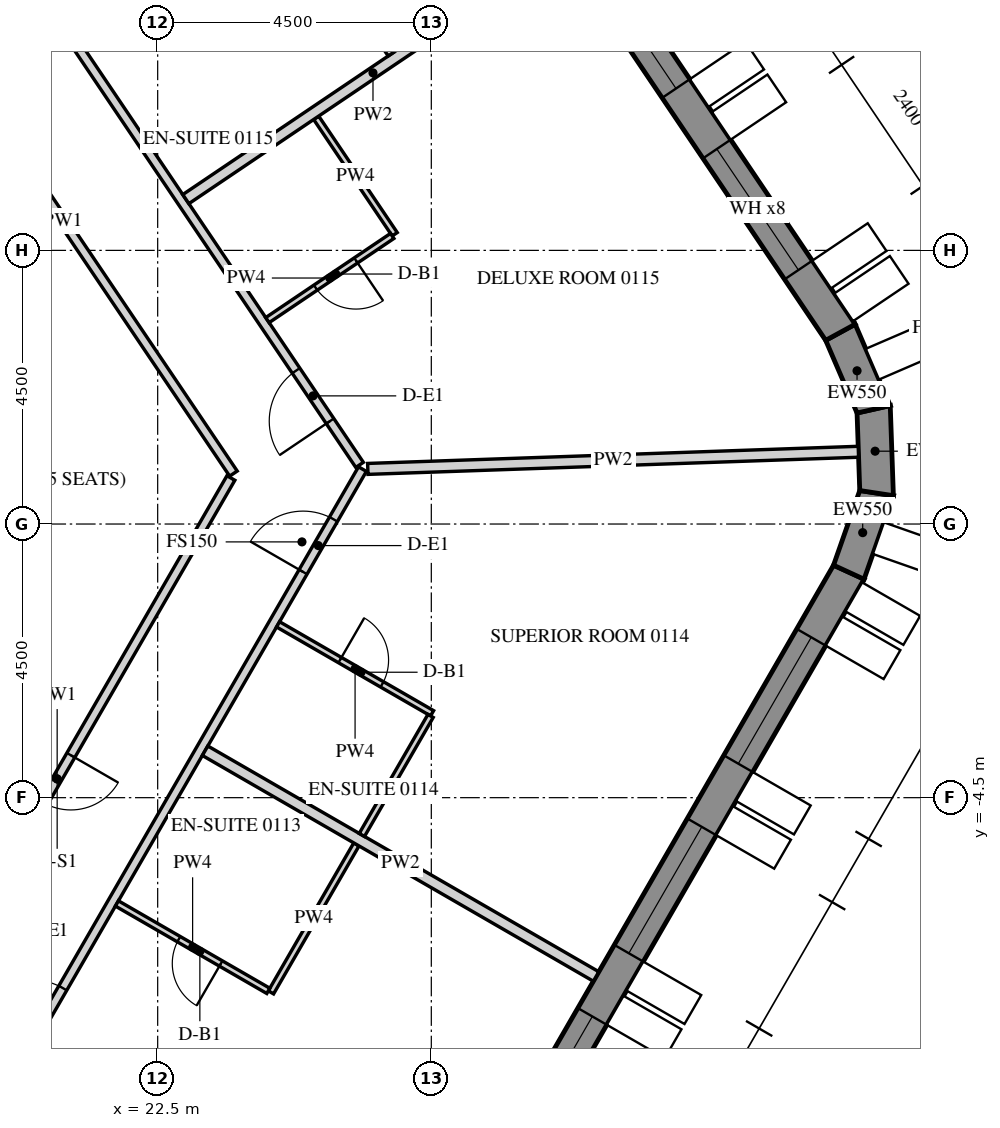
"""IFC4 building model, lengths in metres.
Left out: names, types, materials, properties, quantities, classifications, styles, units other than length and angle.
Written with IfcOpenShell. Run it as: python <this file> out.ifc"""

import sys

from ifc_helpers import new_model, si_unit, direction, frame, frame_2d, origin, place, context, subcontext, project, spatial, polyline, rectangle, outline, extrude, element, fill, save


model = new_model("IFC4")
c1 = context("Model", 3, precision=1e-05, world=origin(), true_north=direction((0.0, 1.0)))
c2 = subcontext(c1, "Body", "Model", "MODEL_VIEW")
j1 = project(units=[si_unit("LENGTHUNIT", "METRE"), si_unit("PLANEANGLEUNIT", "RADIAN")], contexts=[c1])
p1 = place(None, origin())
s1 = spatial("IfcSite", under=j1, at=p1, CompositionType="ELEMENT")
p2 = place(p1, origin())
s2 = spatial("IfcBuilding", under=s1, at=p2, CompositionType="ELEMENT")
p3 = place(p2, frame((0.0, 0.0, 37.5)))
s3 = spatial("IfcBuildingStorey", under=s2, at=p3, CompositionType="ELEMENT", Elevation=37.5)
p4 = place(p3, frame((18.83, -26.835, -0.15), z_axis=(0.0, 0.0, 1.0), x_axis=(0.500003800416, 0.866023209602, 0.0)))
e1 = element("IfcWall", 1, at=p4, inside=s3, PredefinedType="SOLIDWALL", context=c2, shape_type="SweptSolid", body=[
    extrude(outline(polyline([(-0.022, -0.275), (30.097, -0.275), (30.045, 0.275), (0.022, 0.275), (-0.022, -0.275)])), origin(), (0.0, 0.0, 1.0), 3.9),
])
p5 = place(p4, frame((1.236, 0.0, 1.05)))
e2 = element("IfcOpeningElement", 2, at=p5, cuts=e1, PredefinedType="OPENING", context=c2, shape_type="SweptSolid", body=[
    extrude(rectangle(XDim=2.4, YDim=2.4, at=frame_2d((1.2, 1.2))), frame((0.0, 0.285, 0.0), z_axis=(0.0, -1.0, 0.0), x_axis=(1.0, 0.0, 0.0)), (0.0, 0.0, 1.0), 0.57),
])
p6 = place(p4, frame((4.835, 0.0, 1.05)))
e3 = element("IfcOpeningElement", 3, at=p6, cuts=e1, PredefinedType="OPENING", context=c2, shape_type="SweptSolid", body=[
    extrude(rectangle(XDim=2.4, YDim=2.4, at=frame_2d((1.2, 1.2))), frame((0.0, 0.285, 0.0), z_axis=(0.0, -1.0, 0.0), x_axis=(1.0, 0.0, 0.0)), (0.0, 0.0, 1.0), 0.57),
])
p7 = place(p4, frame((8.436, 0.0, 1.05)))
e4 = element("IfcOpeningElement", 4, at=p7, cuts=e1, PredefinedType="OPENING", context=c2, shape_type="SweptSolid", body=[
    extrude(rectangle(XDim=2.4, YDim=2.4, at=frame_2d((1.2, 1.2))), frame((0.0, 0.285, 0.0), z_axis=(0.0, -1.0, 0.0), x_axis=(1.0, 0.0, 0.0)), (0.0, 0.0, 1.0), 0.57),
])
p8 = place(p4, frame((12.035, 0.0, 1.05)))
e5 = element("IfcOpeningElement", 5, at=p8, cuts=e1, PredefinedType="OPENING", context=c2, shape_type="SweptSolid", body=[
    extrude(rectangle(XDim=2.4, YDim=2.4, at=frame_2d((1.2, 1.2))), frame((0.0, 0.285, 0.0), z_axis=(0.0, -1.0, 0.0), x_axis=(1.0, 0.0, 0.0)), (0.0, 0.0, 1.0), 0.57),
])
p9 = place(p4, frame((15.635, 0.0, 1.05)))
e6 = element("IfcOpeningElement", 6, at=p9, cuts=e1, PredefinedType="OPENING", context=c2, shape_type="SweptSolid", body=[
    extrude(rectangle(XDim=2.4, YDim=2.4, at=frame_2d((1.2, 1.2))), frame((0.0, 0.285, 0.0), z_axis=(0.0, -1.0, 0.0), x_axis=(1.0, 0.0, 0.0)), (0.0, 0.0, 1.0), 0.57),
])
p10 = place(p4, frame((19.236, 0.0, 1.05)))
e7 = element("IfcOpeningElement", 7, at=p10, cuts=e1, PredefinedType="OPENING", context=c2, shape_type="SweptSolid", body=[
    extrude(rectangle(XDim=2.4, YDim=2.4, at=frame_2d((1.2, 1.2))), frame((0.0, 0.285, 0.0), z_axis=(0.0, -1.0, 0.0), x_axis=(1.0, 0.0, 0.0)), (0.0, 0.0, 1.0), 0.57),
])
p11 = place(p4, frame((22.835, 0.0, 1.05)))
e8 = element("IfcOpeningElement", 8, at=p11, cuts=e1, PredefinedType="OPENING", context=c2, shape_type="SweptSolid", body=[
    extrude(rectangle(XDim=2.4, YDim=2.4, at=frame_2d((1.2, 1.2))), frame((0.0, 0.285, 0.0), z_axis=(0.0, -1.0, 0.0), x_axis=(1.0, 0.0, 0.0)), (0.0, 0.0, 1.0), 0.57),
])
p12 = place(p4, frame((26.436, 0.0, 1.05)))
e9 = element("IfcOpeningElement", 9, at=p12, cuts=e1, PredefinedType="OPENING", context=c2, shape_type="SweptSolid", body=[
    extrude(rectangle(XDim=2.4, YDim=2.4, at=frame_2d((1.2, 1.2))), frame((0.0, 0.285, 0.0), z_axis=(0.0, -1.0, 0.0), x_axis=(1.0, 0.0, 0.0)), (0.0, 0.0, 1.0), 0.57),
])
p13 = place(p3, frame((33.866, -0.792, -0.15), z_axis=(0.0, 0.0, 1.0), x_axis=(0.33111537203, 0.943590276765, 0.0)))
e10 = element("IfcWall", 10, at=p13, inside=s3, PredefinedType="SOLIDWALL", context=c2, shape_type="SweptSolid", body=[
    extrude(outline(polyline([(-0.026, -0.275), (1.431, -0.275), (1.327, 0.275), (0.026, 0.275), (-0.026, -0.275)])), origin(), (0.0, 0.0, 1.0), 3.9),
])
p14 = place(p3, frame((34.323, 0.509, -0.15), z_axis=(0.0, 0.0, 1.0), x_axis=(-0.034876908462, 0.999391615562, 0.0)))
e11 = element("IfcWall", 11, at=p14, inside=s3, PredefinedType="SOLIDWALL", context=c2, shape_type="SweptSolid", body=[
    extrude(outline(polyline([(-0.052, -0.275), (1.431, -0.275), (1.327, 0.275), (0.052, 0.275), (-0.052, -0.275)])), origin(), (0.0, 0.0, 1.0), 3.9),
])
p15 = place(p3, frame((34.274, 1.887, -0.15), z_axis=(0.0, 0.0, 1.0), x_axis=(-0.396161342798, 0.918180913803, 0.0)))
e12 = element("IfcWall", 12, at=p15, inside=s3, PredefinedType="SOLIDWALL", context=c2, shape_type="SweptSolid", body=[
    extrude(outline(polyline([(-0.052, -0.275), (1.405, -0.275), (1.354, 0.275), (0.052, 0.275), (-0.052, -0.275)])), origin(), (0.0, 0.0, 1.0), 3.9),
])
p16 = place(p3, frame((33.728, 3.153, -0.15), z_axis=(0.0, 0.0, 1.0), x_axis=(-0.559192411416, 0.82903790445, 0.0)))
e13 = element("IfcWall", 13, at=p16, inside=s3, PredefinedType="SOLIDWALL", context=c2, shape_type="SweptSolid", body=[
    extrude(outline(polyline([(-0.026, -0.275), (30.093, -0.275), (30.048, 0.275), (0.026, 0.275), (-0.026, -0.275)])), origin(), (0.0, 0.0, 1.0), 3.9),
])
p17 = place(p16, frame((1.236, 0.0, 1.05)))
e14 = element("IfcOpeningElement", 14, at=p17, cuts=e13, PredefinedType="OPENING", context=c2, shape_type="SweptSolid", body=[
    extrude(rectangle(XDim=2.4, YDim=2.4, at=frame_2d((1.2, 1.2))), frame((0.0, 0.285, 0.0), z_axis=(0.0, -1.0, 0.0), x_axis=(1.0, 0.0, 0.0)), (0.0, 0.0, 1.0), 0.57),
])
p18 = place(p16, frame((4.835, 0.0, 1.05)))
e15 = element("IfcOpeningElement", 15, at=p18, cuts=e13, PredefinedType="OPENING", context=c2, shape_type="SweptSolid", body=[
    extrude(rectangle(XDim=2.4, YDim=2.4, at=frame_2d((1.2, 1.2))), frame((0.0, 0.285, 0.0), z_axis=(0.0, -1.0, 0.0), x_axis=(1.0, 0.0, 0.0)), (0.0, 0.0, 1.0), 0.57),
])
p19 = place(p16, frame((8.436, 0.0, 1.05)))
e16 = element("IfcOpeningElement", 16, at=p19, cuts=e13, PredefinedType="OPENING", context=c2, shape_type="SweptSolid", body=[
    extrude(rectangle(XDim=2.4, YDim=2.4, at=frame_2d((1.2, 1.2))), frame((0.0, 0.285, 0.0), z_axis=(0.0, -1.0, 0.0), x_axis=(1.0, 0.0, 0.0)), (0.0, 0.0, 1.0), 0.57),
])
p20 = place(p16, frame((12.035, 0.0, 1.05)))
e17 = element("IfcOpeningElement", 17, at=p20, cuts=e13, PredefinedType="OPENING", context=c2, shape_type="SweptSolid", body=[
    extrude(rectangle(XDim=2.4, YDim=2.4, at=frame_2d((1.2, 1.2))), frame((0.0, 0.285, 0.0), z_axis=(0.0, -1.0, 0.0), x_axis=(1.0, 0.0, 0.0)), (0.0, 0.0, 1.0), 0.57),
])
p21 = place(p16, frame((15.635, 0.0, 1.05)))
e18 = element("IfcOpeningElement", 18, at=p21, cuts=e13, PredefinedType="OPENING", context=c2, shape_type="SweptSolid", body=[
    extrude(rectangle(XDim=2.4, YDim=2.4, at=frame_2d((1.2, 1.2))), frame((0.0, 0.285, 0.0), z_axis=(0.0, -1.0, 0.0), x_axis=(1.0, 0.0, 0.0)), (0.0, 0.0, 1.0), 0.57),
])
p22 = place(p16, frame((19.236, 0.0, 1.05)))
e19 = element("IfcOpeningElement", 19, at=p22, cuts=e13, PredefinedType="OPENING", context=c2, shape_type="SweptSolid", body=[
    extrude(rectangle(XDim=2.4, YDim=2.4, at=frame_2d((1.2, 1.2))), frame((0.0, 0.285, 0.0), z_axis=(0.0, -1.0, 0.0), x_axis=(1.0, 0.0, 0.0)), (0.0, 0.0, 1.0), 0.57),
])
p23 = place(p16, frame((22.835, 0.0, 1.05)))
e20 = element("IfcOpeningElement", 20, at=p23, cuts=e13, PredefinedType="OPENING", context=c2, shape_type="SweptSolid", body=[
    extrude(rectangle(XDim=2.4, YDim=2.4, at=frame_2d((1.2, 1.2))), frame((0.0, 0.285, 0.0), z_axis=(0.0, -1.0, 0.0), x_axis=(1.0, 0.0, 0.0)), (0.0, 0.0, 1.0), 0.57),
])
p24 = place(p16, frame((26.436, 0.0, 1.05)))
e21 = element("IfcOpeningElement", 21, at=p24, cuts=e13, PredefinedType="OPENING", context=c2, shape_type="SweptSolid", body=[
    extrude(rectangle(XDim=2.4, YDim=2.4, at=frame_2d((1.2, 1.2))), frame((0.0, 0.285, 0.0), z_axis=(0.0, -1.0, 0.0), x_axis=(1.0, 0.0, 0.0)), (0.0, 0.0, 1.0), 0.57),
])
p25 = place(p3, frame((13.928, -19.775, 0.0), z_axis=(0.0, 0.0, 1.0), x_axis=(0.50000450071, 0.866022805283, 0.0)))
e22 = element("IfcWall", 22, at=p25, inside=s3, PredefinedType="PARTITIONING", context=c2, shape_type="SweptSolid", body=[
    extrude(rectangle(XDim=23.877, YDim=0.15, at=frame_2d((11.938, 0.0))), origin(), (0.0, 0.0, 1.0), 2.988),
])
p26 = place(p25, frame((8.573, 0.0, 0.0)))
e23 = element("IfcOpeningElement", 23, at=p26, cuts=e22, PredefinedType="OPENING", context=c2, shape_type="SweptSolid", body=[
    extrude(rectangle(XDim=1.0, YDim=2.1, at=frame_2d((0.5, 1.05))), frame((0.0, 0.085, 0.0), z_axis=(0.0, -1.0, 0.0), x_axis=(1.0, 0.0, 0.0)), (0.0, 0.0, 1.0), 0.17),
])
p27 = place(p25, frame((13.022, 0.0, 0.0)))
e24 = element("IfcOpeningElement", 24, at=p27, cuts=e22, PredefinedType="OPENING", context=c2, shape_type="SweptSolid", body=[
    extrude(rectangle(XDim=1.0, YDim=2.1, at=frame_2d((0.5, 1.05))), frame((0.0, 0.085, 0.0), z_axis=(0.0, -1.0, 0.0), x_axis=(1.0, 0.0, 0.0)), (0.0, 0.0, 1.0), 0.17),
])
p28 = place(p25, frame((21.925, 0.0, 0.0)))
e25 = element("IfcOpeningElement", 25, at=p28, cuts=e22, PredefinedType="OPENING", context=c2, shape_type="SweptSolid", body=[
    extrude(rectangle(XDim=1.0, YDim=2.1, at=frame_2d((0.5, 1.05))), frame((0.0, 0.085, 0.0), z_axis=(0.0, -1.0, 0.0), x_axis=(1.0, 0.0, 0.0)), (0.0, 0.0, 1.0), 0.17),
])
p29 = place(p3, frame((25.821, 0.972, 0.0), z_axis=(0.0, 0.0, 1.0), x_axis=(-0.559193816298, 0.829036956845, 0.0)))
e26 = element("IfcWall", 26, at=p29, inside=s3, PredefinedType="PARTITIONING", context=c2, shape_type="SweptSolid", body=[
    extrude(rectangle(XDim=22.002, YDim=0.15, at=frame_2d((11.001, 0.0))), origin(), (0.0, 0.0, 1.0), 2.988),
])
p30 = place(p29, frame((0.869, 0.0, 0.0)))
e27 = element("IfcOpeningElement", 27, at=p30, cuts=e26, PredefinedType="OPENING", context=c2, shape_type="SweptSolid", body=[
    extrude(rectangle(XDim=1.0, YDim=2.1, at=frame_2d((0.5, 1.05))), frame((0.0, 0.085, 0.0), z_axis=(0.0, -1.0, 0.0), x_axis=(1.0, 0.0, 0.0)), (0.0, 0.0, 1.0), 0.17),
])
p31 = place(p29, frame((10.721, 0.0, 0.0)))
e28 = element("IfcOpeningElement", 28, at=p31, cuts=e26, PredefinedType="OPENING", context=c2, shape_type="SweptSolid", body=[
    extrude(rectangle(XDim=1.0, YDim=2.1, at=frame_2d((0.5, 1.05))), frame((0.0, 0.085, 0.0), z_axis=(0.0, -1.0, 0.0), x_axis=(1.0, 0.0, 0.0)), (0.0, 0.0, 1.0), 0.17),
])
p32 = place(p3, frame((18.14, 9.141, 0.0), z_axis=(0.0, 0.0, 1.0), x_axis=(0.55918799196, -0.829040885389, 0.0)))
e29 = element("IfcWall", 29, at=p32, inside=s3, PredefinedType="PARTITIONING", context=c2, shape_type="SweptSolid", body=[
    extrude(rectangle(XDim=10.025, YDim=0.15, at=frame_2d((5.013, 0.0))), origin(), (0.0, 0.0, 1.0), 2.988),
])
p33 = place(p3, frame((23.704, 0.757, 0.0), z_axis=(0.0, 0.0, 1.0), x_axis=(-0.500010297365, -0.866019458516, 0.0)))
e30 = element("IfcWall", 30, at=p33, inside=s3, PredefinedType="PARTITIONING", context=c2, shape_type="SweptSolid", body=[
    extrude(rectangle(XDim=11.429, YDim=0.15, at=frame_2d((5.714, 0.0))), origin(), (0.0, 0.0, 1.0), 2.988),
])
p34 = place(p33, frame((5.264, 0.0, 0.0)))
e31 = element("IfcOpeningElement", 31, at=p34, cuts=e30, PredefinedType="OPENING", context=c2, shape_type="SweptSolid", body=[
    extrude(rectangle(XDim=0.9, YDim=2.1, at=frame_2d((0.45, 1.05))), frame((0.0, 0.085, 0.0), z_axis=(0.0, -1.0, 0.0), x_axis=(1.0, 0.0, 0.0)), (0.0, 0.0, 1.0), 0.17),
])
p35 = place(p3, frame((25.768, -5.269, 0.0), z_axis=(0.0, 0.0, 1.0), x_axis=(-0.499998209175, -0.866026437715, 0.0)))
e32 = element("IfcWall", 32, at=p35, inside=s3, PredefinedType="PARTITIONING", context=c2, shape_type="SweptSolid", body=[
    extrude(rectangle(XDim=2.81, YDim=0.1, at=frame_2d((1.405, 0.0))), origin(), (0.0, 0.0, 1.0), 2.988),
])
p36 = place(p3, frame((24.32, -7.677, 0.0), z_axis=(0.0, 0.0, 1.0), x_axis=(-0.866018712932, 0.500011588718, 0.0)))
e33 = element("IfcWall", 33, at=p36, inside=s3, PredefinedType="PARTITIONING", context=c2, shape_type="SweptSolid", body=[
    extrude(rectangle(XDim=2.875, YDim=0.1, at=frame_2d((1.438, 0.0))), origin(), (0.0, 0.0, 1.0), 2.988),
])
p37 = place(p36, frame((0.9, 0.0, 0.0)))
e34 = element("IfcOpeningElement", 34, at=p37, cuts=e33, PredefinedType="OPENING", context=c2, shape_type="SweptSolid", body=[
    extrude(rectangle(XDim=0.8, YDim=2.1, at=frame_2d((0.4, 1.05))), frame((0.0, 0.06, 0.0), z_axis=(0.0, -1.0, 0.0), x_axis=(1.0, 0.0, 0.0)), (0.0, 0.0, 1.0), 0.12),
])
p38 = place(p3, frame((29.71, -7.441, 0.0), z_axis=(0.0, 0.0, 1.0), x_axis=(-0.866014745021, 0.500018461065, 0.0)))
e35 = element("IfcWall", 35, at=p38, inside=s3, PredefinedType="PARTITIONING", context=c2, shape_type="SweptSolid", body=[
    extrude(rectangle(XDim=7.425, YDim=0.18, at=frame_2d((3.712, 0.0))), origin(), (0.0, 0.0, 1.0), 2.988),
])
p39 = place(p3, frame((24.48, -1.65, 0.0), z_axis=(0.0, 0.0, 1.0), x_axis=(0.866046596414, -0.499963291492, 0.0)))
e36 = element("IfcWall", 36, at=p39, inside=s3, PredefinedType="PARTITIONING", context=c2, shape_type="SweptSolid", body=[
    extrude(rectangle(XDim=2.925, YDim=0.1, at=frame_2d((1.462, 0.0))), origin(), (0.0, 0.0, 1.0), 2.988),
])
p40 = place(p39, frame((1.175, 0.0, 0.0)))
e37 = element("IfcOpeningElement", 37, at=p40, cuts=e36, PredefinedType="OPENING", context=c2, shape_type="SweptSolid", body=[
    extrude(rectangle(XDim=0.8, YDim=2.1, at=frame_2d((0.4, 1.05))), frame((0.0, 0.06, 0.0), z_axis=(0.0, -1.0, 0.0), x_axis=(1.0, 0.0, 0.0)), (0.0, 0.0, 1.0), 0.12),
])
p41 = place(p3, frame((26.988, -3.156, 0.0), z_axis=(0.0, 0.0, 1.0), x_axis=(-0.4999967785, -0.866027263711, 0.0)))
e38 = element("IfcWall", 38, at=p41, inside=s3, PredefinedType="PARTITIONING", context=c2, shape_type="SweptSolid", body=[
    extrude(rectangle(XDim=2.26, YDim=0.1, at=frame_2d((1.13, 0.0))), origin(), (0.0, 0.0, 1.0), 2.988),
])
p42 = place(p3, frame((34.023, 1.188, 0.0), z_axis=(0.0, 0.0, 1.0), x_axis=(-0.999390818315, -0.03489974594, 0.0)))
e39 = element("IfcWall", 39, at=p42, inside=s3, PredefinedType="PARTITIONING", context=c2, shape_type="SweptSolid", body=[
    extrude(rectangle(XDim=8.073, YDim=0.18, at=frame_2d((4.036, 0.0))), origin(), (0.0, 0.0, 1.0), 2.988),
])
p43 = place(p3, frame((25.107, 6.68, 0.0), z_axis=(0.0, 0.0, 1.0), x_axis=(0.559204176839, -0.829029968461, 0.0)))
e40 = element("IfcWall", 40, at=p43, inside=s3, PredefinedType="PARTITIONING", context=c2, shape_type="SweptSolid", body=[
    extrude(rectangle(XDim=2.31, YDim=0.1, at=frame_2d((1.155, 0.0))), origin(), (0.0, 0.0, 1.0), 2.988),
])
p44 = place(p3, frame((26.357, 4.737, 0.0), z_axis=(0.0, 0.0, 1.0), x_axis=(-0.829094460354, -0.559108554585, 0.0)))
e41 = element("IfcWall", 41, at=p44, inside=s3, PredefinedType="PARTITIONING", context=c2, shape_type="SweptSolid", body=[
    extrude(rectangle(XDim=2.475, YDim=0.1, at=frame_2d((1.238, 0.0))), origin(), (0.0, 0.0, 1.0), 2.988),
])
p45 = place(p44, frame((0.72, 0.0, 0.0)))
e42 = element("IfcOpeningElement", 42, at=p45, cuts=e41, PredefinedType="OPENING", context=c2, shape_type="SweptSolid", body=[
    extrude(rectangle(XDim=0.8, YDim=2.1, at=frame_2d((0.4, 1.05))), frame((0.0, 0.06, 0.0), z_axis=(0.0, -1.0, 0.0), x_axis=(1.0, 0.0, 0.0)), (0.0, 0.0, 1.0), 0.12),
])
p46 = place(p3, frame((29.119, 9.495, 0.0), z_axis=(0.0, 0.0, 1.0), x_axis=(-0.829038452737, -0.559191598545, 0.0)))
e43 = element("IfcWall", 43, at=p46, inside=s3, PredefinedType="PARTITIONING", context=c2, shape_type="SweptSolid", body=[
    extrude(rectangle(XDim=7.425, YDim=0.18, at=frame_2d((3.713, 0.0))), origin(), (0.0, 0.0, 1.0), 2.988),
])
p47 = place(p3, frame((26.333, 7.724, 0.0), z_axis=(0.0, 0.0, 1.0), x_axis=(-0.559185029686, 0.829042883435, 0.0)))
e44 = element("IfcWall", 44, at=p47, inside=s3, PredefinedType="PARTITIONING", context=c2, shape_type="SweptSolid", body=[
    extrude(rectangle(XDim=7.11, YDim=0.1, at=frame_2d((3.555, 0.0))), origin(), (0.0, 0.0, 1.0), 2.988),
])
p48 = place(p47, frame((3.06, 0.0, 0.0)))
e45 = element("IfcOpeningElement", 45, at=p48, cuts=e44, PredefinedType="OPENING", context=c2, shape_type="SweptSolid", body=[
    extrude(rectangle(XDim=0.9, YDim=2.1, at=frame_2d((0.45, 1.05))), frame((0.0, 0.06, 0.0), z_axis=(0.0, -1.0, 0.0), x_axis=(1.0, 0.0, 0.0)), (0.0, 0.0, 1.0), 0.12),
])
p49 = place(p10, frame((0.0, 0.205, 0.0)))
e46 = element("IfcWindow", 46, at=p49, inside=s3, PartitioningType="DOUBLE_PANEL_VERTICAL", PredefinedType="WINDOW", context=c2, shape_type="SweptSolid", body=[
    extrude(rectangle(XDim=2.4, YDim=2.4, at=frame_2d((1.2, 1.2))), frame((0.0, 0.03, 0.0), z_axis=(0.0, -1.0, 0.0), x_axis=(1.0, 0.0, 0.0)), (0.0, 0.0, 1.0), 0.06),
])
fill(e7, e46)
p50 = place(p11, frame((0.0, 0.205, 0.0)))
e47 = element("IfcWindow", 47, at=p50, inside=s3, PartitioningType="DOUBLE_PANEL_VERTICAL", PredefinedType="WINDOW", context=c2, shape_type="SweptSolid", body=[
    extrude(rectangle(XDim=2.4, YDim=2.4, at=frame_2d((1.2, 1.2))), frame((0.0, 0.03, 0.0), z_axis=(0.0, -1.0, 0.0), x_axis=(1.0, 0.0, 0.0)), (0.0, 0.0, 1.0), 0.06),
])
fill(e8, e47)
p51 = place(p12, frame((0.0, 0.205, 0.0)))
e48 = element("IfcWindow", 48, at=p51, inside=s3, PartitioningType="DOUBLE_PANEL_VERTICAL", PredefinedType="WINDOW", context=c2, shape_type="SweptSolid", body=[
    extrude(rectangle(XDim=2.4, YDim=2.4, at=frame_2d((1.2, 1.2))), frame((0.0, 0.03, 0.0), z_axis=(0.0, -1.0, 0.0), x_axis=(1.0, 0.0, 0.0)), (0.0, 0.0, 1.0), 0.06),
])
fill(e9, e48)
p52 = place(p17, frame((0.0, 0.205, 0.0)))
e49 = element("IfcWindow", 49, at=p52, inside=s3, PartitioningType="DOUBLE_PANEL_VERTICAL", PredefinedType="WINDOW", context=c2, shape_type="SweptSolid", body=[
    extrude(rectangle(XDim=2.4, YDim=2.4, at=frame_2d((1.2, 1.2))), frame((0.0, 0.03, 0.0), z_axis=(0.0, -1.0, 0.0), x_axis=(1.0, 0.0, 0.0)), (0.0, 0.0, 1.0), 0.06),
])
fill(e14, e49)
p53 = place(p18, frame((0.0, 0.205, 0.0)))
e50 = element("IfcWindow", 50, at=p53, inside=s3, PartitioningType="DOUBLE_PANEL_VERTICAL", PredefinedType="WINDOW", context=c2, shape_type="SweptSolid", body=[
    extrude(rectangle(XDim=2.4, YDim=2.4, at=frame_2d((1.2, 1.2))), frame((0.0, 0.03, 0.0), z_axis=(0.0, -1.0, 0.0), x_axis=(1.0, 0.0, 0.0)), (0.0, 0.0, 1.0), 0.06),
])
fill(e15, e50)
p54 = place(p27, origin())
e51 = element("IfcDoor", 51, at=p54, inside=s3, OperationType="SINGLE_SWING_RIGHT", PredefinedType="DOOR", context=c2, shape_type="SweptSolid", body=[
    extrude(rectangle(XDim=1.0, YDim=2.1, at=frame_2d((0.5, 1.05))), frame((0.0, 0.025, 0.0), z_axis=(0.0, -1.0, 0.0), x_axis=(1.0, 0.0, 0.0)), (0.0, 0.0, 1.0), 0.05),
])
fill(e24, e51)
p55 = place(p37, origin())
e52 = element("IfcDoor", 52, at=p55, inside=s3, OperationType="SINGLE_SWING_RIGHT", PredefinedType="DOOR", context=c2, shape_type="SweptSolid", body=[
    extrude(rectangle(XDim=0.8, YDim=2.1, at=frame_2d((0.4, 1.05))), frame((0.0, 0.025, 0.0), z_axis=(0.0, -1.0, 0.0), x_axis=(1.0, 0.0, 0.0)), (0.0, 0.0, 1.0), 0.05),
])
fill(e34, e52)
p56 = place(p28, origin())
e53 = element("IfcDoor", 53, at=p56, inside=s3, OperationType="SINGLE_SWING_RIGHT", PredefinedType="DOOR", context=c2, shape_type="SweptSolid", body=[
    extrude(rectangle(XDim=1.0, YDim=2.1, at=frame_2d((0.5, 1.05))), frame((0.0, 0.025, 0.0), z_axis=(0.0, -1.0, 0.0), x_axis=(1.0, 0.0, 0.0)), (0.0, 0.0, 1.0), 0.05),
])
fill(e25, e53)
p57 = place(p40, origin())
e54 = element("IfcDoor", 54, at=p57, inside=s3, OperationType="SINGLE_SWING_LEFT", PredefinedType="DOOR", context=c2, shape_type="SweptSolid", body=[
    extrude(rectangle(XDim=0.8, YDim=2.1, at=frame_2d((0.4, 1.05))), frame((0.0, 0.025, 0.0), z_axis=(0.0, -1.0, 0.0), x_axis=(1.0, 0.0, 0.0)), (0.0, 0.0, 1.0), 0.05),
])
fill(e37, e54)
p58 = place(p30, origin())
e55 = element("IfcDoor", 55, at=p58, inside=s3, OperationType="SINGLE_SWING_RIGHT", PredefinedType="DOOR", context=c2, shape_type="SweptSolid", body=[
    extrude(rectangle(XDim=1.0, YDim=2.1, at=frame_2d((0.5, 1.05))), frame((0.0, 0.025, 0.0), z_axis=(0.0, -1.0, 0.0), x_axis=(1.0, 0.0, 0.0)), (0.0, 0.0, 1.0), 0.05),
])
fill(e27, e55)
p59 = place(p45, origin())
e56 = element("IfcDoor", 56, at=p59, inside=s3, OperationType="SINGLE_SWING_RIGHT", PredefinedType="DOOR", context=c2, shape_type="SweptSolid", body=[
    extrude(rectangle(XDim=0.8, YDim=2.1, at=frame_2d((0.4, 1.05))), frame((0.0, 0.025, 0.0), z_axis=(0.0, -1.0, 0.0), x_axis=(1.0, 0.0, 0.0)), (0.0, 0.0, 1.0), 0.05),
])
fill(e42, e56)
p60 = place(p34, origin())
e57 = element("IfcDoor", 57, at=p60, inside=s3, OperationType="SINGLE_SWING_LEFT", PredefinedType="DOOR", context=c2, shape_type="SweptSolid", body=[
    extrude(rectangle(XDim=0.9, YDim=2.1, at=frame_2d((0.45, 1.05))), frame((0.0, 0.025, 0.0), z_axis=(0.0, -1.0, 0.0), x_axis=(1.0, 0.0, 0.0)), (0.0, 0.0, 1.0), 0.05),
])
fill(e31, e57)
save(model, sys.argv[1])
